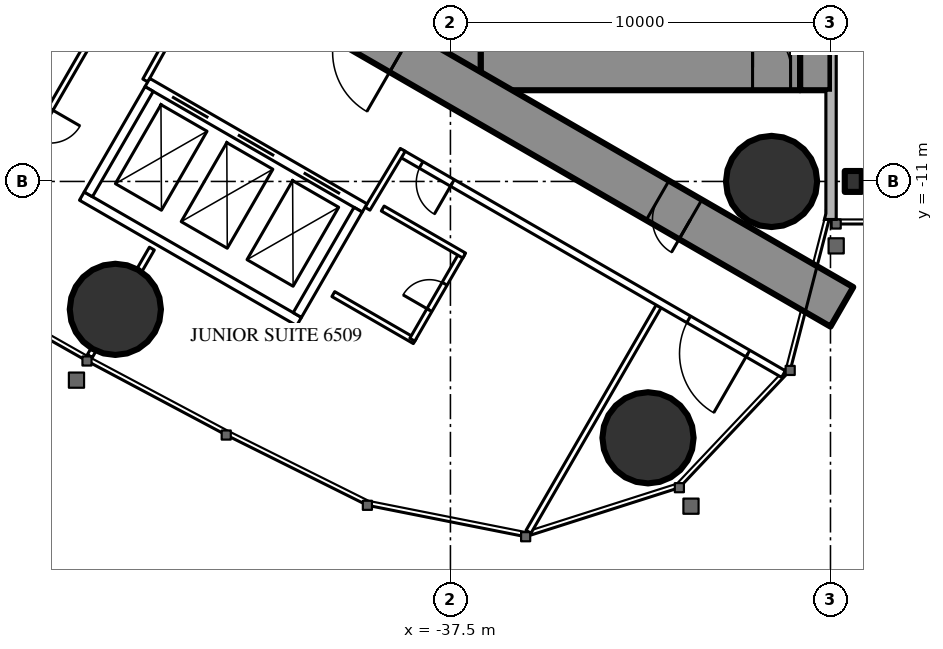
"""IFC4 building model, lengths in metres.
Left out: names, types, materials, properties, quantities, classifications, styles, units other than length and angle.
Written with IfcOpenShell. Run it as: python <this file> out.ifc"""

import sys

from ifc_helpers import new_model, si_unit, direction, frame, frame_2d, origin, origin_2d, place, context, subcontext, project, spatial, rectangle, circle, i_section, extrude, element, fill, save


model = new_model("IFC4")
c1 = context("Model", 3, precision=1e-05, world=origin(), true_north=direction((0.0, 1.0)))
c2 = subcontext(c1, "Body", "Model", "MODEL_VIEW")
j1 = project(units=[si_unit("LENGTHUNIT", "METRE"), si_unit("PLANEANGLEUNIT", "RADIAN")], contexts=[c1])
p1 = place(None, origin())
s1 = spatial("IfcSite", under=j1, at=p1, CompositionType="ELEMENT")
p2 = place(p1, origin())
s2 = spatial("IfcBuilding", under=s1, at=p2, CompositionType="ELEMENT")
p3 = place(p2, frame((0.0, 0.0, 244.1)))
s3 = spatial("IfcBuildingStorey", under=s2, at=p3, CompositionType="ELEMENT", Elevation=244.1)
for number, where, z_axis, x_axis in (
    (1, (-32.301, -17.745, 0.0), (0.0, 0.0, 1.0), (1.0, 0.0, 0.0)),
    (2, (-29.05, -11.0, 0.0), (0.0, 0.0, 1.0), (1.0, 0.0, 0.0)),
    (3, (-46.317, -14.365, 0.0), (0.0, 0.0, 1.0), (1.0, 0.0, 0.0)),
):
    element("IfcColumn", number, at=place(p3, frame(where, z_axis=z_axis, x_axis=x_axis)), inside=s3, PredefinedType="COLUMN", context=c2, shape_type="SweptSolid", body=[
        extrude(circle(Radius=1.2, at=origin_2d()), origin(), (0.0, 0.0, 1.0), 3.6),
    ])
p4 = place(p3, frame((-27.9, 8.6, 0.0), z_axis=(0.0, 0.0, 1.0), x_axis=(0.0, -1.0, 0.0)))
e4 = element("IfcWall", 4, at=p4, inside=s3, PredefinedType="SHEAR", context=c2, shape_type="SweptSolid", body=[
    extrude(rectangle(XDim=17.2, YDim=0.8, at=frame_2d((8.6, 0.0))), origin(), (0.0, 0.0, 1.0), 3.6),
])
p5 = place(p4, frame((6.95, 0.0, 0.0)))
e5 = element("IfcOpeningElement", 5, at=p5, cuts=e4, PredefinedType="OPENING", context=c2, shape_type="SweptSolid", body=[
    extrude(rectangle(XDim=0.9, YDim=2.2, at=frame_2d((0.45, 1.1))), frame((0.0, 0.41, 0.0), z_axis=(0.0, -1.0, 0.0), x_axis=(1.0, 0.0, 0.0)), (0.0, 0.0, 1.0), 0.82),
])
p6 = place(p3, frame((-37.3, 8.6, 0.0), z_axis=(0.0, 0.0, 1.0), x_axis=(0.0, -1.0, 0.0)))
e6 = element("IfcWall", 6, at=p6, inside=s3, PredefinedType="SHEAR", context=c2, shape_type="SweptSolid", body=[
    extrude(rectangle(XDim=17.2, YDim=1.2, at=frame_2d((8.6, 0.0))), origin(), (0.0, 0.0, 1.0), 3.6),
])
p7 = place(p6, frame((7.7, 0.0, 0.0)))
e7 = element("IfcOpeningElement", 7, at=p7, cuts=e6, PredefinedType="OPENING", context=c2, shape_type="SweptSolid", body=[
    extrude(rectangle(XDim=1.8, YDim=2.2, at=frame_2d((0.9, 1.1))), frame((0.0, 0.61, 0.0), z_axis=(0.0, -1.0, 0.0), x_axis=(1.0, 0.0, 0.0)), (0.0, 0.0, 1.0), 1.22),
])
p8 = place(p3, frame((-28.3, -8.0, 0.0), z_axis=(0.0, 0.0, 1.0), x_axis=(-1.0, 0.0, 0.0)))
e8 = element("IfcWall", 8, at=p8, inside=s3, PredefinedType="SHEAR", context=c2, shape_type="SweptSolid", body=[
    extrude(rectangle(XDim=8.4, YDim=1.2, at=frame_2d((4.2, 0.0))), origin(), (0.0, 0.0, 1.0), 3.6),
])
p9 = place(p8, frame((0.25, 0.0, 0.0)))
e9 = element("IfcOpeningElement", 9, at=p9, cuts=e8, PredefinedType="OPENING", context=c2, shape_type="SweptSolid", body=[
    extrude(rectangle(XDim=1.0, YDim=2.2, at=frame_2d((0.5, 1.1))), frame((0.0, 0.61, 0.0), z_axis=(0.0, -1.0, 0.0), x_axis=(1.0, 0.0, 0.0)), (0.0, 0.0, 1.0), 1.22),
])
p10 = place(p3, frame((-27.2, -14.3, 0.0), z_axis=(0.0, 0.0, 1.0), x_axis=(-0.866024021859, 0.500002393557, 0.0)))
e10 = element("IfcWall", 10, at=p10, inside=s3, PredefinedType="SHEAR", context=c2, shape_type="SweptSolid", body=[
    extrude(rectangle(XDim=27.907, YDim=1.2, at=frame_2d((13.954, 0.0))), origin(), (0.0, 0.0, 1.0), 3.6),
])
p11 = place(p10, frame((4.6, 0.0, 0.0)))
e11 = element("IfcOpeningElement", 11, at=p11, cuts=e10, PredefinedType="OPENING", context=c2, shape_type="SweptSolid", body=[
    extrude(rectangle(XDim=1.0, YDim=2.2, at=frame_2d((0.5, 1.1))), frame((0.0, 0.61, 0.0), z_axis=(0.0, -1.0, 0.0), x_axis=(1.0, 0.0, 0.0)), (0.0, 0.0, 1.0), 1.22),
])
p12 = place(p10, frame((13.395, 0.0, 0.0)))
e12 = element("IfcOpeningElement", 12, at=p12, cuts=e10, PredefinedType="OPENING", context=c2, shape_type="SweptSolid", body=[
    extrude(rectangle(XDim=1.8, YDim=2.2, at=frame_2d((0.9, 1.1))), frame((0.0, 0.61, 0.0), z_axis=(0.0, -1.0, 0.0), x_axis=(1.0, 0.0, 0.0)), (0.0, 0.0, 1.0), 1.22),
])
p13 = place(p3, frame((-26.9, -11.0, 0.0), z_axis=(0.0, 0.0, 1.0), x_axis=(1.0, 0.0, 0.0)))
e13 = element("IfcColumn", 13, at=p13, inside=s3, PredefinedType="COLUMN", context=c2, shape_type="SweptSolid", body=[
    extrude(i_section(OverallWidth=0.448, OverallDepth=0.55, WebThickness=0.072, FlangeThickness=0.115, FilletRadius=0.02, at=origin_2d()), origin(), (0.0, 0.0, 1.0), 3.6),
])
p14 = place(p3, frame((-32.022, -14.287, 0.0), z_axis=(0.0, 0.0, 1.0), x_axis=(-0.50000019414, -0.866025291697, 0.0)))
e14 = element("IfcWall", 14, at=p14, inside=s3, PredefinedType="PARTITIONING", context=c2, shape_type="SweptSolid", body=[
    extrude(rectangle(XDim=6.848, YDim=0.15, at=frame_2d((3.424, 0.0))), origin(), (0.0, 0.0, 1.0), 3.35),
])
p15 = place(p3, frame((-46.898, -15.439, 0.0), z_axis=(0.0, 0.0, 1.0), x_axis=(-0.500232303069, -0.865891241997, 0.0)))
e15 = element("IfcWall", 15, at=p15, inside=s3, PredefinedType="PARTITIONING", context=c2, shape_type="SweptSolid", body=[
    extrude(rectangle(XDim=0.18, YDim=0.15, at=frame_2d((0.09, 0.0))), origin(), (0.0, 0.0, 1.0), 2.45),
])
p16 = place(p3, frame((-46.274, -6.059, 0.0), z_axis=(0.0, 0.0, 1.0), x_axis=(-0.500020471368, -0.866013584312, 0.0)))
e16 = element("IfcWall", 16, at=p16, inside=s3, PredefinedType="PARTITIONING", context=c2, shape_type="SweptSolid", body=[
    extrude(rectangle(XDim=6.028, YDim=0.15, at=frame_2d((3.014, 0.0))), origin(), (0.0, 0.0, 1.0), 2.45),
])
p17 = place(p16, frame((3.5, 0.0, 0.0)))
e17 = element("IfcOpeningElement", 17, at=p17, cuts=e16, PredefinedType="OPENING", context=c2, shape_type="SweptSolid", body=[
    extrude(rectangle(XDim=0.9, YDim=2.2, at=frame_2d((0.45, 1.1))), frame((0.0, 0.085, 0.0), z_axis=(0.0, -1.0, 0.0), x_axis=(1.0, 0.0, 0.0)), (0.0, 0.0, 1.0), 0.17),
])
p18 = place(p3, frame((-45.356, -12.767, 0.0), z_axis=(0.0, 0.0, 1.0), x_axis=(-0.499886366516, -0.866091000168, 0.0)))
e18 = element("IfcWall", 18, at=p18, inside=s3, PredefinedType="PARTITIONING", context=c2, shape_type="SweptSolid", body=[
    extrude(rectangle(XDim=0.645, YDim=0.15, at=frame_2d((0.322, 0.0))), origin(), (0.0, 0.0, 1.0), 3.35),
])
p19 = place(p3, frame((-28.737, -16.068, 0.0), z_axis=(0.0, 0.0, 1.0), x_axis=(-0.866029399323, 0.49999307946, 0.0)))
e19 = element("IfcWall", 19, at=p19, inside=s3, PredefinedType="PARTITIONING", context=c2, shape_type="SweptSolid", body=[
    extrude(rectangle(XDim=11.61, YDim=0.2, at=frame_2d((5.805, 0.0))), origin(), (0.0, 0.0, 1.0), 3.35),
])
p20 = place(p19, frame((1.08, 0.0, 0.0)))
e20 = element("IfcOpeningElement", 20, at=p20, cuts=e19, PredefinedType="OPENING", context=c2, shape_type="SweptSolid", body=[
    extrude(rectangle(XDim=1.8, YDim=2.04, at=frame_2d((0.9, 1.02))), frame((0.0, 0.11, 0.0), z_axis=(0.0, -1.0, 0.0), x_axis=(1.0, 0.0, 0.0)), (0.0, 0.0, 1.0), 0.22),
])
p21 = place(p19, frame((10.06, 0.0, 0.0)))
e21 = element("IfcOpeningElement", 21, at=p21, cuts=e19, PredefinedType="OPENING", context=c2, shape_type="SweptSolid", body=[
    extrude(rectangle(XDim=0.95, YDim=2.2, at=frame_2d((0.475, 1.1))), frame((0.0, 0.11, 0.0), z_axis=(0.0, -1.0, 0.0), x_axis=(1.0, 0.0, 0.0)), (0.0, 0.0, 1.0), 0.22),
])
for number, where, z_axis, x_axis in (
    (22, (-39.683, -11.718, 0.0), (0.0, 0.0, 1.0), (0.514, 0.858, 0.0)),
    (23, (-44.652, -6.764, 0.0), (0.0, 0.0, 1.0), (-0.485, -0.874, 0.0)),
):
    element("IfcWall", number, at=place(p3, frame(where, z_axis=z_axis, x_axis=x_axis)), inside=s3, PredefinedType="PARTITIONING", context=c2, shape_type="SweptSolid", body=[
        extrude(rectangle(XDim=1.805, YDim=0.15, at=frame_2d((0.903, 0.0))), origin(), (0.0, 0.0, 1.0), 3.35),
    ])
p22 = place(p3, frame((-38.438, -15.202, 0.0), z_axis=(0.0, 0.0, 1.0), x_axis=(-0.866073894602, 0.499916002032, 0.0)))
e24 = element("IfcWall", 24, at=p22, inside=s3, PredefinedType="PARTITIONING", context=c2, shape_type="SweptSolid", body=[
    extrude(rectangle(XDim=2.475, YDim=0.15, at=frame_2d((1.238, 0.0))), origin(), (0.0, 0.0, 1.0), 3.35),
])
p23 = place(p3, frame((-37.203, -12.913, 0.0), z_axis=(0.0, 0.0, 1.0), x_axis=(-0.500006934395, -0.866021400173, 0.0)))
e25 = element("IfcWall", 25, at=p23, inside=s3, PredefinedType="PARTITIONING", context=c2, shape_type="SweptSolid", body=[
    extrude(rectangle(XDim=2.6, YDim=0.15, at=frame_2d((1.3, 0.0))), origin(), (0.0, 0.0, 1.0), 3.35),
])
p24 = place(p23, frame((0.9, 0.0, 0.0)))
e26 = element("IfcOpeningElement", 26, at=p24, cuts=e25, PredefinedType="OPENING", context=c2, shape_type="SweptSolid", body=[
    extrude(rectangle(XDim=0.8, YDim=2.2, at=frame_2d((0.4, 1.1))), frame((0.0, 0.085, 0.0), z_axis=(0.0, -1.0, 0.0), x_axis=(1.0, 0.0, 0.0)), (0.0, 0.0, 1.0), 0.17),
])
p25 = place(p3, frame((-37.138, -12.95, 0.0), z_axis=(0.0, 0.0, 1.0), x_axis=(-0.866031185235, 0.4999899861, 0.0)))
e27 = element("IfcWall", 27, at=p25, inside=s3, PredefinedType="PARTITIONING", context=c2, shape_type="SweptSolid", body=[
    extrude(rectangle(XDim=2.475, YDim=0.15, at=frame_2d((1.238, 0.0))), origin(), (0.0, 0.0, 1.0), 2.5),
])
p26 = place(p3, frame((-39.758, -11.697, 0.0), z_axis=(0.0, 0.0, 1.0), x_axis=(-0.866024194504, 0.500002094529, 0.0)))
e28 = element("IfcWall", 28, at=p26, inside=s3, PredefinedType="PARTITIONING", context=c2, shape_type="SweptSolid", body=[
    extrude(rectangle(XDim=6.6, YDim=0.25, at=frame_2d((3.3, 0.0))), origin(), (0.0, 0.0, 1.0), 3.35),
])
p27 = place(p26, frame((0.75, 0.0, 0.0)))
e29 = element("IfcOpeningElement", 29, at=p27, cuts=e28, PredefinedType="OPENING", context=c2, shape_type="SweptSolid", body=[
    extrude(rectangle(XDim=1.1, YDim=2.2, at=frame_2d((0.55, 1.1))), frame((0.0, 0.135, 0.0), z_axis=(0.0, -1.0, 0.0), x_axis=(1.0, 0.0, 0.0)), (0.0, 0.0, 1.0), 0.27),
])
p28 = place(p26, frame((2.75, 0.0, 0.0)))
e30 = element("IfcOpeningElement", 30, at=p28, cuts=e28, PredefinedType="OPENING", context=c2, shape_type="SweptSolid", body=[
    extrude(rectangle(XDim=1.1, YDim=2.2, at=frame_2d((0.55, 1.1))), frame((0.0, 0.135, 0.0), z_axis=(0.0, -1.0, 0.0), x_axis=(1.0, 0.0, 0.0)), (0.0, 0.0, 1.0), 0.27),
])
p29 = place(p26, frame((4.75, 0.0, 0.0)))
e31 = element("IfcOpeningElement", 31, at=p29, cuts=e28, PredefinedType="OPENING", context=c2, shape_type="SweptSolid", body=[
    extrude(rectangle(XDim=1.1, YDim=2.2, at=frame_2d((0.55, 1.1))), frame((0.0, 0.135, 0.0), z_axis=(0.0, -1.0, 0.0), x_axis=(1.0, 0.0, 0.0)), (0.0, 0.0, 1.0), 0.27),
])
p30 = place(p3, frame((-41.482, -14.686, 0.0), z_axis=(0.0, 0.0, 1.0), x_axis=(-0.86603344179, 0.499986077507, 0.0)))
e32 = element("IfcWall", 32, at=p30, inside=s3, PredefinedType="PARTITIONING", context=c2, shape_type="SweptSolid", body=[
    extrude(rectangle(XDim=6.6, YDim=0.25, at=frame_2d((3.3, 0.0))), origin(), (0.0, 0.0, 1.0), 3.35),
])
for number, where, z_axis, x_axis in (
    (33, (-39.928, -11.743, 0.0), (0.0, 0.0, 1.0), (-0.5, -0.866, 0.0)),
    (34, (-45.428, -8.568, 0.0), (0.0, 0.0, 1.0), (-0.5, -0.866, 0.0)),
):
    element("IfcWall", number, at=place(p3, frame(where, z_axis=z_axis, x_axis=x_axis)), inside=s3, PredefinedType="PARTITIONING", context=c2, shape_type="SweptSolid", body=[
        extrude(rectangle(XDim=3.201, YDim=0.25, at=frame_2d((1.6, 0.0))), origin(), (0.0, 0.0, 1.0), 3.35),
    ])
p31 = place(p20, origin())
e35 = element("IfcDoor", 35, at=p31, inside=s3, OperationType="DOUBLE_DOOR_SINGLE_SWING", PredefinedType="DOOR", context=c2, shape_type="SweptSolid", body=[
    extrude(rectangle(XDim=1.8, YDim=2.04, at=frame_2d((0.9, 1.02))), frame((0.0, 0.025, 0.0), z_axis=(0.0, -1.0, 0.0), x_axis=(1.0, 0.0, 0.0)), (0.0, 0.0, 1.0), 0.05),
])
fill(e20, e35)
p32 = place(p24, origin())
e36 = element("IfcDoor", 36, at=p32, inside=s3, OperationType="SINGLE_SWING_RIGHT", PredefinedType="DOOR", context=c2, shape_type="SweptSolid", body=[
    extrude(rectangle(XDim=0.8, YDim=2.2, at=frame_2d((0.4, 1.1))), frame((0.0, 0.025, 0.0), z_axis=(0.0, -1.0, 0.0), x_axis=(1.0, 0.0, 0.0)), (0.0, 0.0, 1.0), 0.05),
])
fill(e26, e36)
p33 = place(p21, origin())
e37 = element("IfcDoor", 37, at=p33, inside=s3, OperationType="SINGLE_SWING_LEFT", PredefinedType="DOOR", context=c2, shape_type="SweptSolid", body=[
    extrude(rectangle(XDim=0.95, YDim=2.2, at=frame_2d((0.475, 1.1))), frame((0.0, 0.025, 0.0), z_axis=(0.0, -1.0, 0.0), x_axis=(1.0, 0.0, 0.0)), (0.0, 0.0, 1.0), 0.05),
])
fill(e21, e37)
p34 = place(p11, origin())
e38 = element("IfcDoor", 38, at=p34, inside=s3, OperationType="SINGLE_SWING_LEFT", PredefinedType="DOOR", context=c2, shape_type="SweptSolid", body=[
    extrude(rectangle(XDim=1.0, YDim=2.2, at=frame_2d((0.5, 1.1))), frame((0.0, 0.025, 0.0), z_axis=(0.0, -1.0, 0.0), x_axis=(1.0, 0.0, 0.0)), (0.0, 0.0, 1.0), 0.05),
])
fill(e11, e38)
p35 = place(p12, origin())
e39 = element("IfcDoor", 39, at=p35, inside=s3, OperationType="DOUBLE_DOOR_SINGLE_SWING", PredefinedType="DOOR", context=c2, shape_type="SweptSolid", body=[
    extrude(rectangle(XDim=1.8, YDim=2.2, at=frame_2d((0.9, 1.1))), frame((0.0, 0.025, 0.0), z_axis=(0.0, -1.0, 0.0), x_axis=(1.0, 0.0, 0.0)), (0.0, 0.0, 1.0), 0.05),
])
fill(e12, e39)
p36 = place(p9, origin())
e40 = element("IfcDoor", 40, at=p36, inside=s3, OperationType="SINGLE_SWING_RIGHT", PredefinedType="DOOR", context=c2, shape_type="SweptSolid", body=[
    extrude(rectangle(XDim=1.0, YDim=2.2, at=frame_2d((0.5, 1.1))), frame((0.0, 0.025, 0.0), z_axis=(0.0, -1.0, 0.0), x_axis=(1.0, 0.0, 0.0)), (0.0, 0.0, 1.0), 0.05),
])
fill(e9, e40)
p37 = place(p27, origin())
e41 = element("IfcDoor", 41, at=p37, inside=s3, OperationType="DOUBLE_DOOR_SLIDING", PredefinedType="USERDEFINED", context=c2, shape_type="SweptSolid", body=[
    extrude(rectangle(XDim=1.1, YDim=2.2, at=frame_2d((0.55, 1.1))), frame((0.0, 0.025, 0.0), z_axis=(0.0, -1.0, 0.0), x_axis=(1.0, 0.0, 0.0)), (0.0, 0.0, 1.0), 0.05),
])
fill(e29, e41)
p38 = place(p28, origin())
e42 = element("IfcDoor", 42, at=p38, inside=s3, OperationType="DOUBLE_DOOR_SLIDING", PredefinedType="USERDEFINED", context=c2, shape_type="SweptSolid", body=[
    extrude(rectangle(XDim=1.1, YDim=2.2, at=frame_2d((0.55, 1.1))), frame((0.0, 0.025, 0.0), z_axis=(0.0, -1.0, 0.0), x_axis=(1.0, 0.0, 0.0)), (0.0, 0.0, 1.0), 0.05),
])
fill(e30, e42)
p39 = place(p29, origin())
e43 = element("IfcDoor", 43, at=p39, inside=s3, OperationType="DOUBLE_DOOR_SLIDING", PredefinedType="USERDEFINED", context=c2, shape_type="SweptSolid", body=[
    extrude(rectangle(XDim=1.1, YDim=2.2, at=frame_2d((0.55, 1.1))), frame((0.0, 0.025, 0.0), z_axis=(0.0, -1.0, 0.0), x_axis=(1.0, 0.0, 0.0)), (0.0, 0.0, 1.0), 0.05),
])
fill(e31, e43)
save(model, sys.argv[1])
